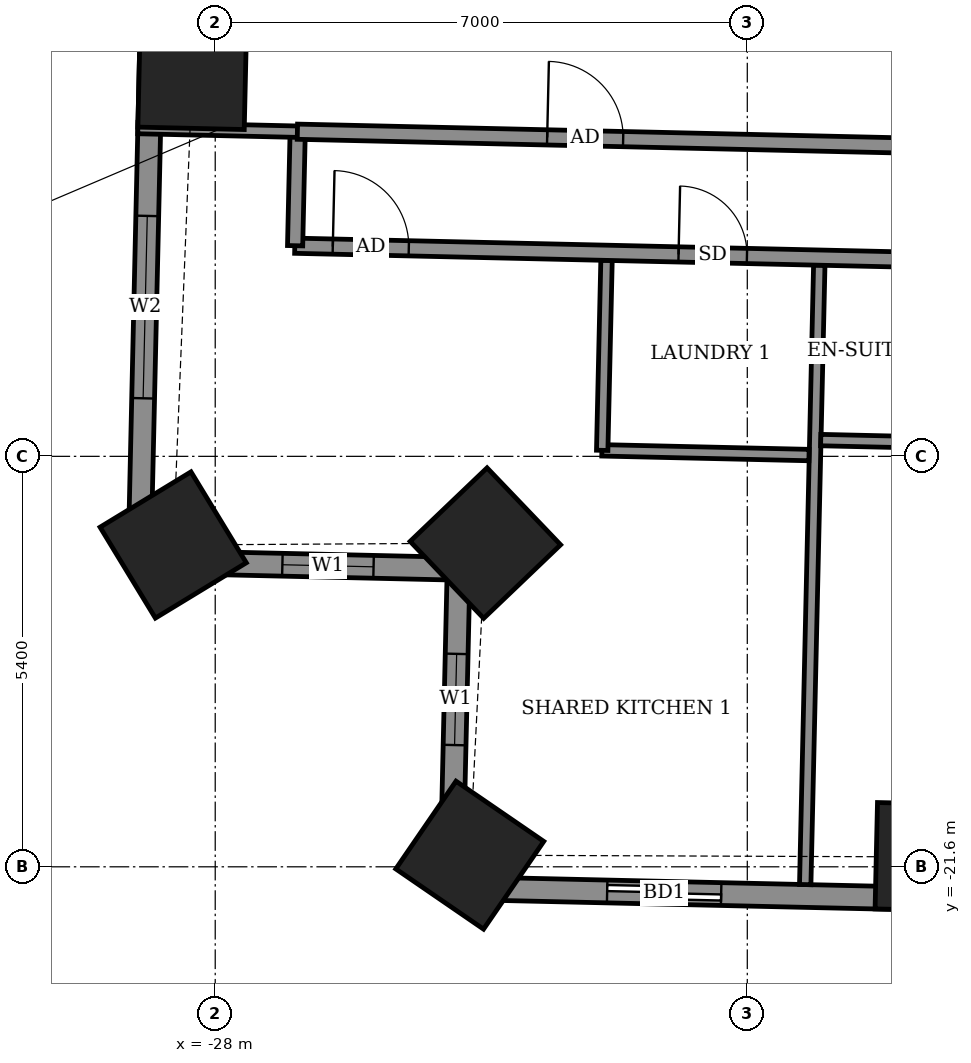
"""IFC4 building model, lengths in metres.
Left out: names, types, materials, properties, quantities, classifications, styles, units other than length and angle.
Written with IfcOpenShell. Run it as: python <this file> out.ifc"""

import sys

from ifc_helpers import new_model, si_unit, direction, frame, frame_2d, origin, origin_2d, place, context, subcontext, project, spatial, rectangle, extrude, element, fill, save


model = new_model("IFC4")
c1 = context("Model", 3, precision=1e-05, world=origin(), true_north=direction((0.0, 1.0)))
c2 = subcontext(c1, "Body", "Model", "MODEL_VIEW")
j1 = project(units=[si_unit("LENGTHUNIT", "METRE"), si_unit("PLANEANGLEUNIT", "RADIAN")], contexts=[c1])
p1 = place(None, origin())
s1 = spatial("IfcSite", under=j1, at=p1, CompositionType="ELEMENT")
p2 = place(p1, origin())
s2 = spatial("IfcBuilding", under=s1, at=p2, CompositionType="ELEMENT")
p3 = place(p2, frame((0.0, 0.0, 101.9)))
s3 = spatial("IfcBuildingStorey", under=s2, at=p3, CompositionType="ELEMENT", Elevation=101.9)
for number, where, z_axis, x_axis in (
    (1, (-28.302, -11.185, -0.55), (0.0, 0.0, 1.0), (-0.023, -1.0, 0.0)),
    (2, (-28.553, -17.366, -0.55), (0.0, 0.0, 1.0), (0.52, -0.854, 0.0)),
    (3, (-24.446, -17.341, -0.55), (0.0, 0.0, 1.0), (0.691, -0.723, 0.0)),
    (4, (-24.651, -21.447, -0.55), (0.0, 0.0, 1.0), (0.825, -0.566, 0.0)),
    (5, (-18.603, -21.47, -0.55), (0.0, 0.0, 1.0), (1.0, -0.023, 0.0)),
):
    element("IfcColumn", number, at=place(p3, frame(where, z_axis=z_axis, x_axis=x_axis)), inside=s3, PredefinedType="COLUMN", context=c2, shape_type="SweptSolid", body=[
        extrude(rectangle(XDim=1.4, YDim=1.4, at=origin_2d()), origin(), (0.0, 0.0, 1.0), 3.6),
    ])
p4 = place(p3, frame((-28.702, -4.557, 0.0), z_axis=(0.0, 0.0, 1.0), x_axis=(-0.022653729471, -0.999743371341, 0.0)))
e6 = element("IfcWall", 6, at=p4, inside=s3, PredefinedType="SOLIDWALL", context=c2, shape_type="SweptSolid", body=[
    extrude(rectangle(XDim=13.03, YDim=0.3, at=frame_2d((6.515, 0.0))), origin(), (0.0, 0.0, 1.0), 3.05),
])
p5 = place(p4, frame((1.042, 0.0, 0.0)))
e7 = element("IfcOpeningElement", 7, at=p5, cuts=e6, PredefinedType="OPENING", context=c2, shape_type="SweptSolid", body=[
    extrude(rectangle(XDim=1.5, YDim=2.4, at=frame_2d((0.75, 1.2))), frame((0.0, 0.16, 0.0), z_axis=(0.0, -1.0, 0.0), x_axis=(1.0, 0.0, 0.0)), (0.0, 0.0, 1.0), 0.32),
])
p6 = place(p4, frame((3.398, 0.0, 0.9)))
e8 = element("IfcOpeningElement", 8, at=p6, cuts=e6, PredefinedType="OPENING", context=c2, shape_type="SweptSolid", body=[
    extrude(rectangle(XDim=2.4, YDim=1.5, at=frame_2d((1.2, 0.75))), frame((0.0, 0.16, 0.0), z_axis=(0.0, -1.0, 0.0), x_axis=(1.0, 0.0, 0.0)), (0.0, 0.0, 1.0), 0.32),
])
p7 = place(p4, frame((8.482, 0.0, 0.9)))
e9 = element("IfcOpeningElement", 9, at=p7, cuts=e6, PredefinedType="OPENING", context=c2, shape_type="SweptSolid", body=[
    extrude(rectangle(XDim=2.4, YDim=1.5, at=frame_2d((1.2, 0.75))), frame((0.0, 0.16, 0.0), z_axis=(0.0, -1.0, 0.0), x_axis=(1.0, 0.0, 0.0)), (0.0, 0.0, 1.0), 0.32),
])
p8 = place(p3, frame((-28.997, -17.583, 0.0), z_axis=(0.0, 0.0, 1.0), x_axis=(0.999739037152, -0.022844202663, 0.0)))
e10 = element("IfcWall", 10, at=p8, inside=s3, PredefinedType="SOLIDWALL", context=c2, shape_type="SweptSolid", body=[
    extrude(rectangle(XDim=4.2, YDim=0.3, at=frame_2d((2.1, 0.0))), origin(), (0.0, 0.0, 1.0), 2.55),
])
p9 = place(p8, frame((1.881, 0.0, 0.9)))
e11 = element("IfcOpeningElement", 11, at=p9, cuts=e10, PredefinedType="OPENING", context=c2, shape_type="SweptSolid", body=[
    extrude(rectangle(XDim=1.2, YDim=1.5, at=frame_2d((0.6, 0.75))), frame((0.0, 0.16, 0.0), z_axis=(0.0, -1.0, 0.0), x_axis=(1.0, 0.0, 0.0)), (0.0, 0.0, 1.0), 0.32),
])
p10 = place(p3, frame((-24.798, -17.679, 0.0), z_axis=(0.0, 0.0, 1.0), x_axis=(-0.022844202663, -0.999739037152, 0.0)))
e12 = element("IfcWall", 12, at=p10, inside=s3, PredefinedType="SOLIDWALL", context=c2, shape_type="SweptSolid", body=[
    extrude(rectangle(XDim=4.2, YDim=0.3, at=frame_2d((2.1, 0.0))), origin(), (0.0, 0.0, 1.0), 2.55),
])
p11 = place(p10, frame((1.12, 0.0, 0.9)))
e13 = element("IfcOpeningElement", 13, at=p11, cuts=e12, PredefinedType="OPENING", context=c2, shape_type="SweptSolid", body=[
    extrude(rectangle(XDim=1.2, YDim=1.5, at=frame_2d((0.6, 0.75))), frame((0.0, 0.16, 0.0), z_axis=(0.0, -1.0, 0.0), x_axis=(1.0, 0.0, 0.0)), (0.0, 0.0, 1.0), 0.32),
])
p12 = place(p3, frame((-24.894, -21.878, 0.0), z_axis=(0.0, 0.0, 1.0), x_axis=(0.999742689045, -0.022683820265, 0.0)))
e14 = element("IfcWall", 14, at=p12, inside=s3, PredefinedType="SOLIDWALL", context=c2, shape_type="SweptSolid", body=[
    extrude(rectangle(XDim=44.708, YDim=0.3, at=frame_2d((22.354, 0.0))), origin(), (0.0, 0.0, 1.0), 3.05),
])
p13 = place(p12, frame((2.051, 0.0, 0.0)))
e15 = element("IfcOpeningElement", 15, at=p13, cuts=e14, PredefinedType="OPENING", context=c2, shape_type="SweptSolid", body=[
    extrude(rectangle(XDim=1.5, YDim=2.4, at=frame_2d((0.75, 1.2))), frame((0.0, 0.16, 0.0), z_axis=(0.0, -1.0, 0.0), x_axis=(1.0, 0.0, 0.0)), (0.0, 0.0, 1.0), 0.32),
])
p14 = place(p12, frame((7.265, 0.0, 0.0)))
e16 = element("IfcOpeningElement", 16, at=p14, cuts=e14, PredefinedType="OPENING", context=c2, shape_type="SweptSolid", body=[
    extrude(rectangle(XDim=1.5, YDim=2.4, at=frame_2d((0.75, 1.2))), frame((0.0, 0.16, 0.0), z_axis=(0.0, -1.0, 0.0), x_axis=(1.0, 0.0, 0.0)), (0.0, 0.0, 1.0), 0.32),
])
p15 = place(p12, frame((10.03, 0.0, 0.0)))
e17 = element("IfcOpeningElement", 17, at=p15, cuts=e14, PredefinedType="OPENING", context=c2, shape_type="SweptSolid", body=[
    extrude(rectangle(XDim=1.5, YDim=2.4, at=frame_2d((0.75, 1.2))), frame((0.0, 0.16, 0.0), z_axis=(0.0, -1.0, 0.0), x_axis=(1.0, 0.0, 0.0)), (0.0, 0.0, 1.0), 0.32),
])
p16 = place(p12, frame((15.5, 0.0, 0.0)))
e18 = element("IfcOpeningElement", 18, at=p16, cuts=e14, PredefinedType="OPENING", context=c2, shape_type="SweptSolid", body=[
    extrude(rectangle(XDim=1.5, YDim=2.4, at=frame_2d((0.75, 1.2))), frame((0.0, 0.16, 0.0), z_axis=(0.0, -1.0, 0.0), x_axis=(1.0, 0.0, 0.0)), (0.0, 0.0, 1.0), 0.32),
])
p17 = place(p12, frame((20.745, 0.0, 0.0)))
e19 = element("IfcOpeningElement", 19, at=p17, cuts=e14, PredefinedType="OPENING", context=c2, shape_type="SweptSolid", body=[
    extrude(rectangle(XDim=1.5, YDim=2.4, at=frame_2d((0.75, 1.2))), frame((0.0, 0.16, 0.0), z_axis=(0.0, -1.0, 0.0), x_axis=(1.0, 0.0, 0.0)), (0.0, 0.0, 1.0), 0.32),
])
p18 = place(p12, frame((26.41, 0.0, 0.0)))
e20 = element("IfcOpeningElement", 20, at=p18, cuts=e14, PredefinedType="OPENING", context=c2, shape_type="SweptSolid", body=[
    extrude(rectangle(XDim=1.2, YDim=2.4, at=frame_2d((0.6, 1.2))), frame((0.0, 0.16, 0.0), z_axis=(0.0, -1.0, 0.0), x_axis=(1.0, 0.0, 0.0)), (0.0, 0.0, 1.0), 0.32),
])
p19 = place(p12, frame((29.024, 0.0, 0.0)))
e21 = element("IfcOpeningElement", 21, at=p19, cuts=e14, PredefinedType="OPENING", context=c2, shape_type="SweptSolid", body=[
    extrude(rectangle(XDim=1.5, YDim=2.4, at=frame_2d((0.75, 1.2))), frame((0.0, 0.16, 0.0), z_axis=(0.0, -1.0, 0.0), x_axis=(1.0, 0.0, 0.0)), (0.0, 0.0, 1.0), 0.32),
])
p20 = place(p12, frame((34.45, 0.0, 0.0)))
e22 = element("IfcOpeningElement", 22, at=p20, cuts=e14, PredefinedType="OPENING", context=c2, shape_type="SweptSolid", body=[
    extrude(rectangle(XDim=1.5, YDim=2.4, at=frame_2d((0.75, 1.2))), frame((0.0, 0.16, 0.0), z_axis=(0.0, -1.0, 0.0), x_axis=(1.0, 0.0, 0.0)), (0.0, 0.0, 1.0), 0.32),
])
p21 = place(p12, frame((40.087, 0.0, 0.9)))
e23 = element("IfcOpeningElement", 23, at=p21, cuts=e14, PredefinedType="OPENING", context=c2, shape_type="SweptSolid", body=[
    extrude(rectangle(XDim=2.4, YDim=1.5, at=frame_2d((1.2, 0.75))), frame((0.0, 0.16, 0.0), z_axis=(0.0, -1.0, 0.0), x_axis=(1.0, 0.0, 0.0)), (0.0, 0.0, 1.0), 0.32),
])
p22 = place(p3, frame((-20.238, -21.834, 0.0), z_axis=(0.0, 0.0, 1.0), x_axis=(0.0227037155, 0.99974223743, 0.0)))
e24 = element("IfcWall", 24, at=p22, inside=s3, PredefinedType="PARTITIONING", context=c2, shape_type="SweptSolid", body=[
    extrude(rectangle(XDim=8.151, YDim=0.15, at=frame_2d((4.076, 0.0))), origin(), (0.0, 0.0, 1.0), 2.55),
])
p23 = place(p3, frame((-22.913, -16.121, 0.0), z_axis=(0.0, 0.0, 1.0), x_axis=(0.999741187782, -0.022749889061, 0.0)))
e25 = element("IfcWall", 25, at=p23, inside=s3, PredefinedType="PARTITIONING", context=c2, shape_type="SweptSolid", body=[
    extrude(rectangle(XDim=2.726, YDim=0.15, at=frame_2d((1.363, 0.0))), origin(), (0.0, 0.0, 1.0), 3.05),
])
p24 = place(p3, frame((-22.909, -16.121, 0.0), z_axis=(0.0, 0.0, 1.0), x_axis=(0.022756903044, 0.999741028149, 0.0)))
e26 = element("IfcWall", 26, at=p24, inside=s3, PredefinedType="PARTITIONING", context=c2, shape_type="SweptSolid", body=[
    extrude(rectangle(XDim=2.5, YDim=0.15, at=frame_2d((1.25, 0.0))), origin(), (0.0, 0.0, 1.0), 3.05),
])
p25 = place(p3, frame((-20.034, -15.986, 0.0), z_axis=(0.0, 0.0, 1.0), x_axis=(0.999740478815, -0.022781023197, 0.0)))
e27 = element("IfcWall", 27, at=p25, inside=s3, PredefinedType="PARTITIONING", context=c2, shape_type="SweptSolid", body=[
    extrude(rectangle(XDim=2.325, YDim=0.15, at=frame_2d((1.163, 0.0))), origin(), (0.0, 0.0, 1.0), 3.05),
])
p26 = place(p3, frame((-26.953, -13.429, 0.0), z_axis=(0.0, 0.0, 1.0), x_axis=(0.999742734556, -0.02268181435, 0.0)))
e28 = element("IfcWall", 28, at=p26, inside=s3, PredefinedType="PARTITIONING", context=c2, shape_type="SweptSolid", body=[
    extrude(rectangle(XDim=50.708, YDim=0.2, at=frame_2d((25.354, 0.0))), origin(), (0.0, 0.0, 1.0), 3.05),
])
p27 = place(p26, frame((0.5, 0.0, 0.0)))
e29 = element("IfcOpeningElement", 29, at=p27, cuts=e28, PredefinedType="OPENING", context=c2, shape_type="SweptSolid", body=[
    extrude(rectangle(XDim=1.0, YDim=2.1, at=frame_2d((0.5, 1.05))), frame((0.0, 0.11, 0.0), z_axis=(0.0, -1.0, 0.0), x_axis=(1.0, 0.0, 0.0)), (0.0, 0.0, 1.0), 0.22),
])
p28 = place(p26, frame((5.05, 0.0, 0.0)))
e30 = element("IfcOpeningElement", 30, at=p28, cuts=e28, PredefinedType="OPENING", context=c2, shape_type="SweptSolid", body=[
    extrude(rectangle(XDim=0.9, YDim=2.1, at=frame_2d((0.45, 1.05))), frame((0.0, 0.11, 0.0), z_axis=(0.0, -1.0, 0.0), x_axis=(1.0, 0.0, 0.0)), (0.0, 0.0, 1.0), 0.22),
])
p29 = place(p26, frame((9.975, 0.0, 0.0)))
e31 = element("IfcOpeningElement", 31, at=p29, cuts=e28, PredefinedType="OPENING", context=c2, shape_type="SweptSolid", body=[
    extrude(rectangle(XDim=0.9, YDim=2.1, at=frame_2d((0.45, 1.05))), frame((0.0, 0.11, 0.0), z_axis=(0.0, -1.0, 0.0), x_axis=(1.0, 0.0, 0.0)), (0.0, 0.0, 1.0), 0.22),
])
p30 = place(p26, frame((12.175, 0.0, 0.0)))
e32 = element("IfcOpeningElement", 32, at=p30, cuts=e28, PredefinedType="OPENING", context=c2, shape_type="SweptSolid", body=[
    extrude(rectangle(XDim=0.9, YDim=2.1, at=frame_2d((0.45, 1.05))), frame((0.0, 0.11, 0.0), z_axis=(0.0, -1.0, 0.0), x_axis=(1.0, 0.0, 0.0)), (0.0, 0.0, 1.0), 0.22),
])
p31 = place(p26, frame((19.25, 0.0, 0.0)))
e33 = element("IfcOpeningElement", 33, at=p31, cuts=e28, PredefinedType="OPENING", context=c2, shape_type="SweptSolid", body=[
    extrude(rectangle(XDim=0.9, YDim=2.1, at=frame_2d((0.45, 1.05))), frame((0.0, 0.11, 0.0), z_axis=(0.0, -1.0, 0.0), x_axis=(1.0, 0.0, 0.0)), (0.0, 0.0, 1.0), 0.22),
])
p32 = place(p26, frame((21.625, 0.0, 0.0)))
e34 = element("IfcOpeningElement", 34, at=p32, cuts=e28, PredefinedType="OPENING", context=c2, shape_type="SweptSolid", body=[
    extrude(rectangle(XDim=0.9, YDim=2.1, at=frame_2d((0.45, 1.05))), frame((0.0, 0.11, 0.0), z_axis=(0.0, -1.0, 0.0), x_axis=(1.0, 0.0, 0.0)), (0.0, 0.0, 1.0), 0.22),
])
p33 = place(p26, frame((28.7, 0.0, 0.0)))
e35 = element("IfcOpeningElement", 35, at=p33, cuts=e28, PredefinedType="OPENING", context=c2, shape_type="SweptSolid", body=[
    extrude(rectangle(XDim=0.9, YDim=2.1, at=frame_2d((0.45, 1.05))), frame((0.0, 0.11, 0.0), z_axis=(0.0, -1.0, 0.0), x_axis=(1.0, 0.0, 0.0)), (0.0, 0.0, 1.0), 0.22),
])
p34 = place(p26, frame((31.025, 0.0, 0.0)))
e36 = element("IfcOpeningElement", 36, at=p34, cuts=e28, PredefinedType="OPENING", context=c2, shape_type="SweptSolid", body=[
    extrude(rectangle(XDim=0.9, YDim=2.1, at=frame_2d((0.45, 1.05))), frame((0.0, 0.11, 0.0), z_axis=(0.0, -1.0, 0.0), x_axis=(1.0, 0.0, 0.0)), (0.0, 0.0, 1.0), 0.22),
])
p35 = place(p26, frame((38.2, 0.0, 0.0)))
e37 = element("IfcOpeningElement", 37, at=p35, cuts=e28, PredefinedType="OPENING", context=c2, shape_type="SweptSolid", body=[
    extrude(rectangle(XDim=0.9, YDim=2.1, at=frame_2d((0.45, 1.05))), frame((0.0, 0.11, 0.0), z_axis=(0.0, -1.0, 0.0), x_axis=(1.0, 0.0, 0.0)), (0.0, 0.0, 1.0), 0.22),
])
p36 = place(p26, frame((44.484, 0.0, 0.0)))
e38 = element("IfcOpeningElement", 38, at=p36, cuts=e28, PredefinedType="OPENING", context=c2, shape_type="SweptSolid", body=[
    extrude(rectangle(XDim=1.0, YDim=2.1, at=frame_2d((0.5, 1.05))), frame((0.0, 0.11, 0.0), z_axis=(0.0, -1.0, 0.0), x_axis=(1.0, 0.0, 0.0)), (0.0, 0.0, 1.0), 0.22),
])
p37 = place(p3, frame((-26.949, -13.429, 0.0), z_axis=(0.0, 0.0, 1.0), x_axis=(0.022617910375, 0.999744182344, 0.0)))
e39 = element("IfcWall", 39, at=p37, inside=s3, PredefinedType="PARTITIONING", context=c2, shape_type="SweptSolid", body=[
    extrude(rectangle(XDim=1.5, YDim=0.2, at=frame_2d((0.75, 0.0))), origin(), (0.0, 0.0, 1.0), 3.05),
])
p38 = place(p3, frame((-29.018, -11.881, 0.0), z_axis=(0.0, 0.0, 1.0), x_axis=(0.999741236023, -0.022747769011, 0.0)))
e40 = element("IfcWall", 40, at=p38, inside=s3, PredefinedType="PARTITIONING", context=c2, shape_type="SweptSolid", body=[
    extrude(rectangle(XDim=2.104, YDim=0.15, at=frame_2d((1.052, 0.0))), origin(), (0.0, 0.0, 1.0), 2.55),
])
p39 = place(p3, frame((-26.919, -11.929, 0.0), z_axis=(0.0, 0.0, 1.0), x_axis=(0.999741418429, -0.022739751035, 0.0)))
e41 = element("IfcWall", 41, at=p39, inside=s3, PredefinedType="PARTITIONING", context=c2, shape_type="SweptSolid", body=[
    extrude(rectangle(XDim=9.673, YDim=0.2, at=frame_2d((4.837, 0.0))), origin(), (0.0, 0.0, 1.0), 3.05),
])
p40 = place(p39, frame((3.287, 0.0, 0.0)))
e42 = element("IfcOpeningElement", 42, at=p40, cuts=e41, PredefinedType="OPENING", context=c2, shape_type="SweptSolid", body=[
    extrude(rectangle(XDim=1.0, YDim=2.1, at=frame_2d((0.5, 1.05))), frame((0.0, 0.11, 0.0), z_axis=(0.0, -1.0, 0.0), x_axis=(1.0, 0.0, 0.0)), (0.0, 0.0, 1.0), 0.22),
])
p41 = place(p7, origin())
e43 = element("IfcWindow", 43, at=p41, inside=s3, PartitioningType="DOUBLE_PANEL_VERTICAL", PredefinedType="WINDOW", context=c2, shape_type="SweptSolid", body=[
    extrude(rectangle(XDim=2.4, YDim=1.5, at=frame_2d((1.2, 0.75))), frame((0.0, 0.03, 0.0), z_axis=(0.0, -1.0, 0.0), x_axis=(1.0, 0.0, 0.0)), (0.0, 0.0, 1.0), 0.06),
])
fill(e9, e43)
p42 = place(p9, origin())
e44 = element("IfcWindow", 44, at=p42, inside=s3, PartitioningType="SINGLE_PANEL", PredefinedType="WINDOW", context=c2, shape_type="SweptSolid", body=[
    extrude(rectangle(XDim=1.2, YDim=1.5, at=frame_2d((0.6, 0.75))), frame((0.0, 0.03, 0.0), z_axis=(0.0, -1.0, 0.0), x_axis=(1.0, 0.0, 0.0)), (0.0, 0.0, 1.0), 0.06),
])
fill(e11, e44)
p43 = place(p11, origin())
e45 = element("IfcWindow", 45, at=p43, inside=s3, PartitioningType="SINGLE_PANEL", PredefinedType="WINDOW", context=c2, shape_type="SweptSolid", body=[
    extrude(rectangle(XDim=1.2, YDim=1.5, at=frame_2d((0.6, 0.75))), frame((0.0, 0.03, 0.0), z_axis=(0.0, -1.0, 0.0), x_axis=(1.0, 0.0, 0.0)), (0.0, 0.0, 1.0), 0.06),
])
fill(e13, e45)
p44 = place(p13, origin())
e46 = element("IfcDoor", 46, at=p44, inside=s3, OperationType="SLIDING_TO_LEFT", PredefinedType="DOOR", context=c2, shape_type="SweptSolid", body=[
    extrude(rectangle(XDim=1.5, YDim=2.4, at=frame_2d((0.75, 1.2))), frame((0.0, 0.025, 0.0), z_axis=(0.0, -1.0, 0.0), x_axis=(1.0, 0.0, 0.0)), (0.0, 0.0, 1.0), 0.05),
])
fill(e15, e46)
p45 = place(p27, origin())
e47 = element("IfcDoor", 47, at=p45, inside=s3, OperationType="SINGLE_SWING_LEFT", PredefinedType="DOOR", context=c2, shape_type="SweptSolid", body=[
    extrude(rectangle(XDim=1.0, YDim=2.1, at=frame_2d((0.5, 1.05))), frame((0.0, 0.025, 0.0), z_axis=(0.0, -1.0, 0.0), x_axis=(1.0, 0.0, 0.0)), (0.0, 0.0, 1.0), 0.05),
])
fill(e29, e47)
p46 = place(p28, origin())
e48 = element("IfcDoor", 48, at=p46, inside=s3, OperationType="SINGLE_SWING_LEFT", PredefinedType="DOOR", context=c2, shape_type="SweptSolid", body=[
    extrude(rectangle(XDim=0.9, YDim=2.1, at=frame_2d((0.45, 1.05))), frame((0.0, 0.025, 0.0), z_axis=(0.0, -1.0, 0.0), x_axis=(1.0, 0.0, 0.0)), (0.0, 0.0, 1.0), 0.05),
])
fill(e30, e48)
p47 = place(p40, origin())
e49 = element("IfcDoor", 49, at=p47, inside=s3, OperationType="SINGLE_SWING_RIGHT", PredefinedType="DOOR", context=c2, shape_type="SweptSolid", body=[
    extrude(rectangle(XDim=1.0, YDim=2.1, at=frame_2d((0.5, 1.05))), frame((0.0, 0.025, 0.0), z_axis=(0.0, -1.0, 0.0), x_axis=(1.0, 0.0, 0.0)), (0.0, 0.0, 1.0), 0.05),
])
fill(e42, e49)
save(model, sys.argv[1])
